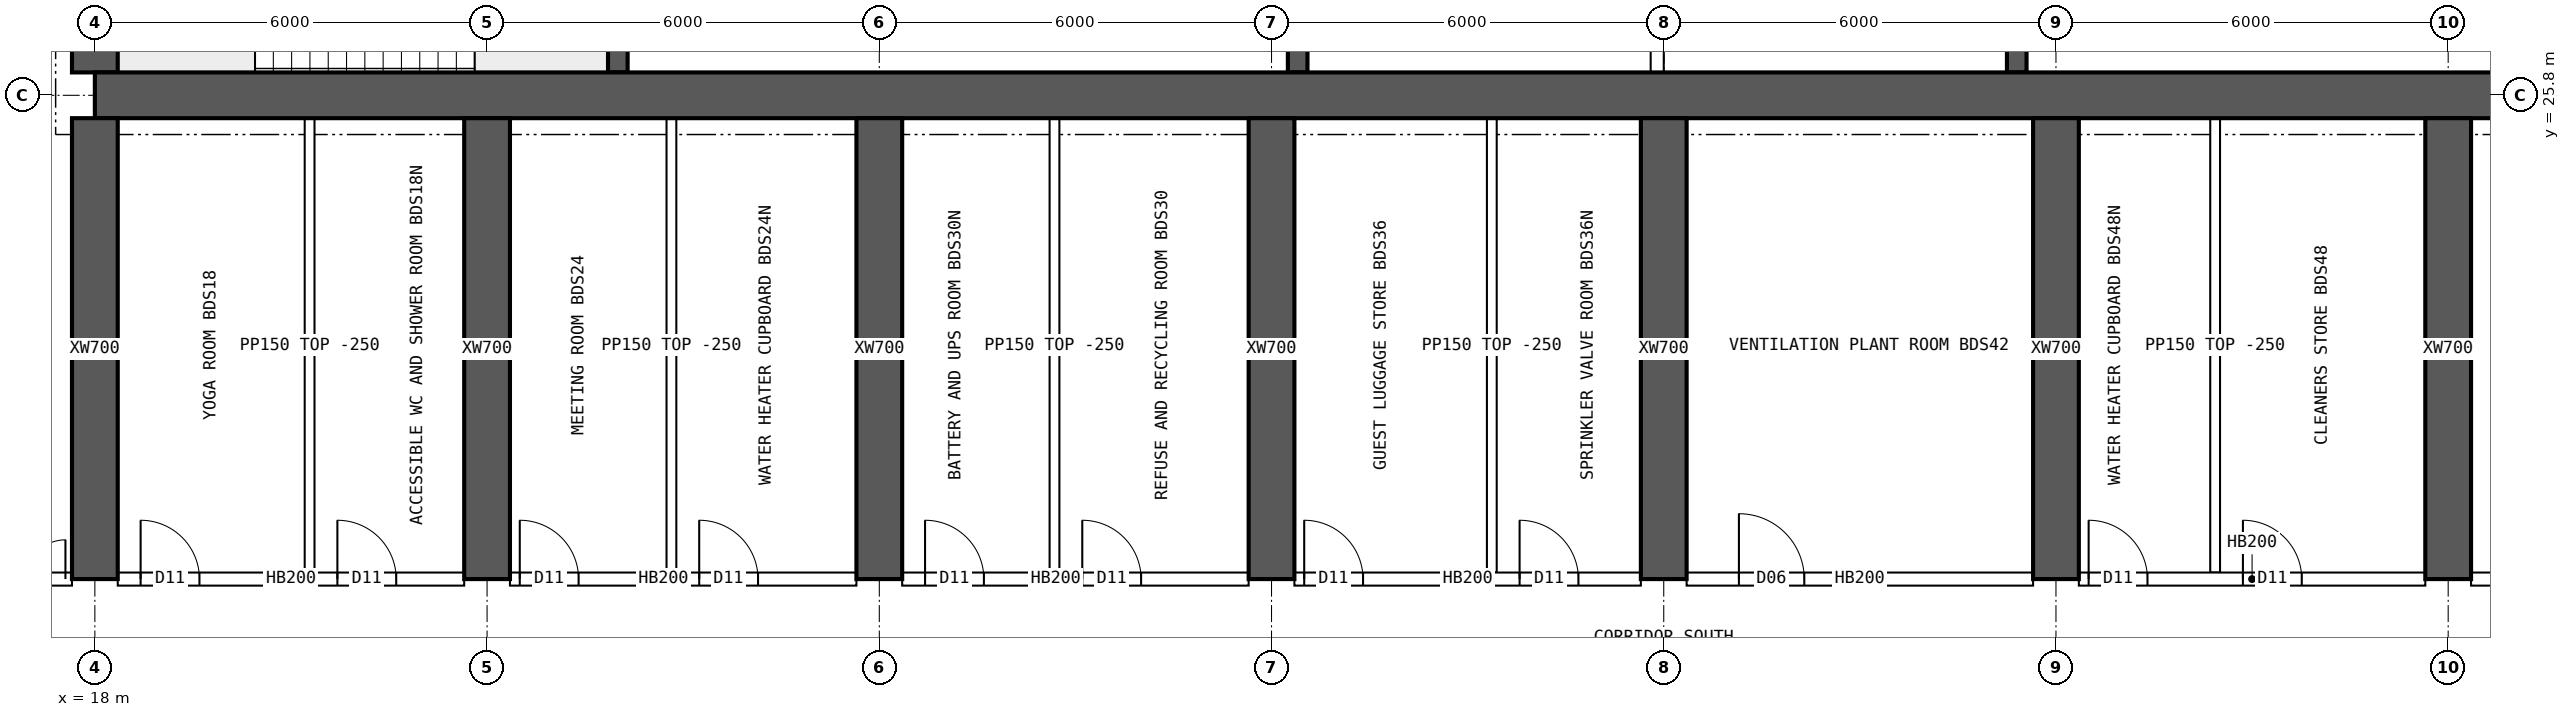
"""IFC4 building model, lengths in metres.
Left out: names, types, materials, properties, quantities, classifications, styles, units other than length and angle.
Written with IfcOpenShell. Run it as: python <this file> out.ifc"""

import sys

from ifc_helpers import new_model, si_unit, direction, frame, frame_2d, origin, place, context, subcontext, project, spatial, rectangle, extrude, element, fill, save


model = new_model("IFC4")
c1 = context("Model", 3, precision=1e-05, world=origin(), true_north=direction((0.0, 1.0)))
c2 = subcontext(c1, "Body", "Model", "MODEL_VIEW")
j1 = project(units=[si_unit("LENGTHUNIT", "METRE"), si_unit("PLANEANGLEUNIT", "RADIAN")], contexts=[c1])
p1 = place(None, origin())
s1 = spatial("IfcSite", under=j1, at=p1, CompositionType="ELEMENT")
p2 = place(p1, origin())
s2 = spatial("IfcBuilding", under=s1, at=p2, CompositionType="ELEMENT")
p3 = place(p2, frame((0.0, 0.0, 208.3)))
s3 = spatial("IfcBuildingStorey", under=s2, at=p3, CompositionType="ELEMENT", Elevation=208.3)
p4 = place(p3, frame((18.0, 25.8, 0.0), z_axis=(0.0, 0.0, 1.0), x_axis=(1.0, 0.0, 0.0)))
e1 = element("IfcWall", 1, at=p4, inside=s3, PredefinedType="SHEAR", context=c2, shape_type="SweptSolid", body=[
    extrude(rectangle(XDim=48.0, YDim=0.7, at=frame_2d((24.0, 0.0))), origin(), (0.0, 0.0, 1.0), 4.5),
])
p5 = place(p3, frame((18.0, 26.15, 0.0), z_axis=(0.0, 0.0, 1.0), x_axis=(0.0, 1.0, 0.0)))
e2 = element("IfcWall", 2, at=p5, inside=s3, PredefinedType="SHEAR", context=c2, shape_type="SweptSolid", body=[
    extrude(rectangle(XDim=11.7, YDim=0.7, at=frame_2d((5.85, 0.0))), origin(), (0.0, 0.0, 1.0), 4.5),
])
p6 = place(p5, frame((5.15, 0.0, 0.0)))
e3 = element("IfcOpeningElement", 3, at=p6, cuts=e2, PredefinedType="OPENING", context=c2, shape_type="SweptSolid", body=[
    extrude(rectangle(XDim=1.2, YDim=2.1, at=frame_2d((0.6, 1.05))), frame((0.0, 0.36, 0.0), z_axis=(0.0, -1.0, 0.0), x_axis=(1.0, 0.0, 0.0)), (0.0, 0.0, 1.0), 0.72),
])
for number, where, z_axis, x_axis in (
    (4, (26.0, 26.15, 0.0), (0.0, 0.0, 1.0), (0.0, 1.0, 0.0)),
    (5, (36.4, 26.15, 0.0), (0.0, 0.0, 1.0), (0.0, 1.0, 0.0)),
    (6, (47.4, 26.15, 0.0), (0.0, 0.0, 1.0), (0.0, 1.0, 0.0)),
):
    element("IfcWall", number, at=place(p3, frame(where, z_axis=z_axis, x_axis=x_axis)), inside=s3, PredefinedType="SHEAR", context=c2, shape_type="SweptSolid", body=[
        extrude(rectangle(XDim=4.1, YDim=0.3, at=frame_2d((2.05, 0.0))), origin(), (0.0, 0.0, 1.0), 4.5),
    ])
for number, where, z_axis, x_axis in (
    (7, (18.0, 18.4, 0.0), (0.0, 0.0, 1.0), (0.0, 1.0, 0.0)),
    (8, (24.0, 18.4, 0.0), (0.0, 0.0, 1.0), (0.0, 1.0, 0.0)),
    (9, (30.0, 18.4, 0.0), (0.0, 0.0, 1.0), (0.0, 1.0, 0.0)),
    (10, (36.0, 18.4, 0.0), (0.0, 0.0, 1.0), (0.0, 1.0, 0.0)),
    (11, (42.0, 18.4, 0.0), (0.0, 0.0, 1.0), (0.0, 1.0, 0.0)),
    (12, (48.0, 18.4, 0.0), (0.0, 0.0, 1.0), (0.0, 1.0, 0.0)),
    (13, (54.0, 18.4, 0.0), (0.0, 0.0, 1.0), (0.0, 1.0, 0.0)),
):
    element("IfcWall", number, at=place(p3, frame(where, z_axis=z_axis, x_axis=x_axis)), inside=s3, PredefinedType="SHEAR", context=c2, shape_type="SweptSolid", body=[
        extrude(rectangle(XDim=7.05, YDim=0.7, at=frame_2d((3.525, 0.0))), origin(), (0.0, 0.0, 1.0), 4.5),
    ])
p7 = place(p3, frame((41.9, 26.15, 0.0), z_axis=(0.0, 0.0, 1.0), x_axis=(0.0, 1.0, 0.0)))
e14 = element("IfcWall", 14, at=p7, inside=s3, PredefinedType="SOLIDWALL", context=c2, shape_type="SweptSolid", body=[
    extrude(rectangle(XDim=4.1, YDim=0.2, at=frame_2d((2.05, 0.0))), origin(), (0.0, 0.0, 1.0), 4.25),
])
p8 = place(p3, frame((15.6, 18.4, 0.0), z_axis=(0.0, 0.0, 1.0), x_axis=(1.0, 0.0, 0.0)))
e15 = element("IfcWall", 15, at=p8, inside=s3, PredefinedType="SOLIDWALL", context=c2, shape_type="SweptSolid", body=[
    extrude(rectangle(XDim=2.05, YDim=0.2, at=frame_2d((1.025, 0.0))), origin(), (0.0, 0.0, 1.0), 4.25),
])
p9 = place(p8, frame((0.75, 0.0, 0.0)))
e16 = element("IfcOpeningElement", 16, at=p9, cuts=e15, PredefinedType="OPENING", context=c2, shape_type="SweptSolid", body=[
    extrude(rectangle(XDim=1.2, YDim=2.1, at=frame_2d((0.6, 1.05))), frame((0.0, 0.11, 0.0), z_axis=(0.0, -1.0, 0.0), x_axis=(1.0, 0.0, 0.0)), (0.0, 0.0, 1.0), 0.22),
])
p10 = place(p3, frame((18.35, 18.4, 0.0), z_axis=(0.0, 0.0, 1.0), x_axis=(1.0, 0.0, 0.0)))
e17 = element("IfcWall", 17, at=p10, inside=s3, PredefinedType="SOLIDWALL", context=c2, shape_type="SweptSolid", body=[
    extrude(rectangle(XDim=5.3, YDim=0.2, at=frame_2d((2.65, 0.0))), origin(), (0.0, 0.0, 1.0), 4.25),
])
p11 = place(p10, frame((0.35, 0.0, 0.0)))
e18 = element("IfcOpeningElement", 18, at=p11, cuts=e17, PredefinedType="OPENING", context=c2, shape_type="SweptSolid", body=[
    extrude(rectangle(XDim=0.9, YDim=2.1, at=frame_2d((0.45, 1.05))), frame((0.0, 0.11, 0.0), z_axis=(0.0, -1.0, 0.0), x_axis=(1.0, 0.0, 0.0)), (0.0, 0.0, 1.0), 0.22),
])
p12 = place(p10, frame((3.36, 0.0, 0.0)))
e19 = element("IfcOpeningElement", 19, at=p12, cuts=e17, PredefinedType="OPENING", context=c2, shape_type="SweptSolid", body=[
    extrude(rectangle(XDim=0.9, YDim=2.1, at=frame_2d((0.45, 1.05))), frame((0.0, 0.11, 0.0), z_axis=(0.0, -1.0, 0.0), x_axis=(1.0, 0.0, 0.0)), (0.0, 0.0, 1.0), 0.22),
])
p13 = place(p3, frame((24.35, 18.4, 0.0), z_axis=(0.0, 0.0, 1.0), x_axis=(1.0, 0.0, 0.0)))
e20 = element("IfcWall", 20, at=p13, inside=s3, PredefinedType="SOLIDWALL", context=c2, shape_type="SweptSolid", body=[
    extrude(rectangle(XDim=5.3, YDim=0.2, at=frame_2d((2.65, 0.0))), origin(), (0.0, 0.0, 1.0), 4.25),
])
p14 = place(p13, frame((0.15, 0.0, 0.0)))
e21 = element("IfcOpeningElement", 21, at=p14, cuts=e20, PredefinedType="OPENING", context=c2, shape_type="SweptSolid", body=[
    extrude(rectangle(XDim=0.9, YDim=2.1, at=frame_2d((0.45, 1.05))), frame((0.0, 0.11, 0.0), z_axis=(0.0, -1.0, 0.0), x_axis=(1.0, 0.0, 0.0)), (0.0, 0.0, 1.0), 0.22),
])
p15 = place(p13, frame((2.895, 0.0, 0.0)))
e22 = element("IfcOpeningElement", 22, at=p15, cuts=e20, PredefinedType="OPENING", context=c2, shape_type="SweptSolid", body=[
    extrude(rectangle(XDim=0.9, YDim=2.1, at=frame_2d((0.45, 1.05))), frame((0.0, 0.11, 0.0), z_axis=(0.0, -1.0, 0.0), x_axis=(1.0, 0.0, 0.0)), (0.0, 0.0, 1.0), 0.22),
])
p16 = place(p3, frame((30.35, 18.4, 0.0), z_axis=(0.0, 0.0, 1.0), x_axis=(1.0, 0.0, 0.0)))
e23 = element("IfcWall", 23, at=p16, inside=s3, PredefinedType="SOLIDWALL", context=c2, shape_type="SweptSolid", body=[
    extrude(rectangle(XDim=5.3, YDim=0.2, at=frame_2d((2.65, 0.0))), origin(), (0.0, 0.0, 1.0), 4.25),
])
p17 = place(p16, frame((0.35, 0.0, 0.0)))
e24 = element("IfcOpeningElement", 24, at=p17, cuts=e23, PredefinedType="OPENING", context=c2, shape_type="SweptSolid", body=[
    extrude(rectangle(XDim=0.9, YDim=2.1, at=frame_2d((0.45, 1.05))), frame((0.0, 0.11, 0.0), z_axis=(0.0, -1.0, 0.0), x_axis=(1.0, 0.0, 0.0)), (0.0, 0.0, 1.0), 0.22),
])
p18 = place(p16, frame((2.755, 0.0, 0.0)))
e25 = element("IfcOpeningElement", 25, at=p18, cuts=e23, PredefinedType="OPENING", context=c2, shape_type="SweptSolid", body=[
    extrude(rectangle(XDim=0.9, YDim=2.1, at=frame_2d((0.45, 1.05))), frame((0.0, 0.11, 0.0), z_axis=(0.0, -1.0, 0.0), x_axis=(1.0, 0.0, 0.0)), (0.0, 0.0, 1.0), 0.22),
])
p19 = place(p3, frame((36.35, 18.4, 0.0), z_axis=(0.0, 0.0, 1.0), x_axis=(1.0, 0.0, 0.0)))
e26 = element("IfcWall", 26, at=p19, inside=s3, PredefinedType="SOLIDWALL", context=c2, shape_type="SweptSolid", body=[
    extrude(rectangle(XDim=5.3, YDim=0.2, at=frame_2d((2.65, 0.0))), origin(), (0.0, 0.0, 1.0), 4.25),
])
p20 = place(p19, frame((0.15, 0.0, 0.0)))
e27 = element("IfcOpeningElement", 27, at=p20, cuts=e26, PredefinedType="OPENING", context=c2, shape_type="SweptSolid", body=[
    extrude(rectangle(XDim=0.9, YDim=2.1, at=frame_2d((0.45, 1.05))), frame((0.0, 0.11, 0.0), z_axis=(0.0, -1.0, 0.0), x_axis=(1.0, 0.0, 0.0)), (0.0, 0.0, 1.0), 0.22),
])
p21 = place(p19, frame((3.445, 0.0, 0.0)))
e28 = element("IfcOpeningElement", 28, at=p21, cuts=e26, PredefinedType="OPENING", context=c2, shape_type="SweptSolid", body=[
    extrude(rectangle(XDim=0.9, YDim=2.1, at=frame_2d((0.45, 1.05))), frame((0.0, 0.11, 0.0), z_axis=(0.0, -1.0, 0.0), x_axis=(1.0, 0.0, 0.0)), (0.0, 0.0, 1.0), 0.22),
])
p22 = place(p3, frame((42.35, 18.4, 0.0), z_axis=(0.0, 0.0, 1.0), x_axis=(1.0, 0.0, 0.0)))
e29 = element("IfcWall", 29, at=p22, inside=s3, PredefinedType="SOLIDWALL", context=c2, shape_type="SweptSolid", body=[
    extrude(rectangle(XDim=5.3, YDim=0.2, at=frame_2d((2.65, 0.0))), origin(), (0.0, 0.0, 1.0), 4.25),
])
p23 = place(p22, frame((0.8, 0.0, 0.0)))
e30 = element("IfcOpeningElement", 30, at=p23, cuts=e29, PredefinedType="OPENING", context=c2, shape_type="SweptSolid", body=[
    extrude(rectangle(XDim=1.0, YDim=2.1, at=frame_2d((0.5, 1.05))), frame((0.0, 0.11, 0.0), z_axis=(0.0, -1.0, 0.0), x_axis=(1.0, 0.0, 0.0)), (0.0, 0.0, 1.0), 0.22),
])
p24 = place(p3, frame((48.35, 18.4, 0.0), z_axis=(0.0, 0.0, 1.0), x_axis=(1.0, 0.0, 0.0)))
e31 = element("IfcWall", 31, at=p24, inside=s3, PredefinedType="SOLIDWALL", context=c2, shape_type="SweptSolid", body=[
    extrude(rectangle(XDim=5.3, YDim=0.2, at=frame_2d((2.65, 0.0))), origin(), (0.0, 0.0, 1.0), 4.25),
])
p25 = place(p24, frame((0.15, 0.0, 0.0)))
e32 = element("IfcOpeningElement", 32, at=p25, cuts=e31, PredefinedType="OPENING", context=c2, shape_type="SweptSolid", body=[
    extrude(rectangle(XDim=0.9, YDim=2.1, at=frame_2d((0.45, 1.05))), frame((0.0, 0.11, 0.0), z_axis=(0.0, -1.0, 0.0), x_axis=(1.0, 0.0, 0.0)), (0.0, 0.0, 1.0), 0.22),
])
p26 = place(p24, frame((2.51, 0.0, 0.0)))
e33 = element("IfcOpeningElement", 33, at=p26, cuts=e31, PredefinedType="OPENING", context=c2, shape_type="SweptSolid", body=[
    extrude(rectangle(XDim=0.9, YDim=2.1, at=frame_2d((0.45, 1.05))), frame((0.0, 0.11, 0.0), z_axis=(0.0, -1.0, 0.0), x_axis=(1.0, 0.0, 0.0)), (0.0, 0.0, 1.0), 0.22),
])
p27 = place(p3, frame((54.35, 18.4, 0.0), z_axis=(0.0, 0.0, 1.0), x_axis=(1.0, 0.0, 0.0)))
e34 = element("IfcWall", 34, at=p27, inside=s3, PredefinedType="SOLIDWALL", context=c2, shape_type="SweptSolid", body=[
    extrude(rectangle(XDim=5.3, YDim=0.2, at=frame_2d((2.65, 0.0))), origin(), (0.0, 0.0, 1.0), 4.25),
])
p28 = place(p27, frame((0.8, 0.0, 0.0)))
e35 = element("IfcOpeningElement", 35, at=p28, cuts=e34, PredefinedType="OPENING", context=c2, shape_type="SweptSolid", body=[
    extrude(rectangle(XDim=1.0, YDim=2.1, at=frame_2d((0.5, 1.05))), frame((0.0, 0.11, 0.0), z_axis=(0.0, -1.0, 0.0), x_axis=(1.0, 0.0, 0.0)), (0.0, 0.0, 1.0), 0.22),
])
for number, where, z_axis, x_axis in (
    (36, (21.285, 18.5, 0.0), (0.0, 0.0, 1.0), (0.0, 1.0, 0.0)),
    (37, (26.82, 18.5, 0.0), (0.0, 0.0, 1.0), (0.0, 1.0, 0.0)),
    (38, (32.68, 18.5, 0.0), (0.0, 0.0, 1.0), (0.0, 1.0, 0.0)),
    (39, (39.37, 18.5, 0.0), (0.0, 0.0, 1.0), (0.0, 1.0, 0.0)),
    (40, (50.435, 18.5, 0.0), (0.0, 0.0, 1.0), (0.0, 1.0, 0.0)),
):
    element("IfcWall", number, at=place(p3, frame(where, z_axis=z_axis, x_axis=x_axis)), inside=s3, PredefinedType="PARTITIONING", context=c2, shape_type="SweptSolid", body=[
        extrude(rectangle(XDim=6.95, YDim=0.15, at=frame_2d((3.475, 0.0))), origin(), (0.0, 0.0, 1.0), 4.25),
    ])
p29 = place(p9, origin())
e41 = element("IfcDoor", 41, at=p29, inside=s3, OperationType="DOUBLE_DOOR_SINGLE_SWING", PredefinedType="DOOR", context=c2, shape_type="SweptSolid", body=[
    extrude(rectangle(XDim=1.2, YDim=2.1, at=frame_2d((0.6, 1.05))), frame((0.0, 0.025, 0.0), z_axis=(0.0, -1.0, 0.0), x_axis=(1.0, 0.0, 0.0)), (0.0, 0.0, 1.0), 0.05),
])
fill(e16, e41)
p30 = place(p11, origin())
e42 = element("IfcDoor", 42, at=p30, inside=s3, OperationType="SINGLE_SWING_LEFT", PredefinedType="DOOR", context=c2, shape_type="SweptSolid", body=[
    extrude(rectangle(XDim=0.9, YDim=2.1, at=frame_2d((0.45, 1.05))), frame((0.0, 0.025, 0.0), z_axis=(0.0, -1.0, 0.0), x_axis=(1.0, 0.0, 0.0)), (0.0, 0.0, 1.0), 0.05),
])
fill(e18, e42)
p31 = place(p12, origin())
e43 = element("IfcDoor", 43, at=p31, inside=s3, OperationType="SINGLE_SWING_LEFT", PredefinedType="DOOR", context=c2, shape_type="SweptSolid", body=[
    extrude(rectangle(XDim=0.9, YDim=2.1, at=frame_2d((0.45, 1.05))), frame((0.0, 0.025, 0.0), z_axis=(0.0, -1.0, 0.0), x_axis=(1.0, 0.0, 0.0)), (0.0, 0.0, 1.0), 0.05),
])
fill(e19, e43)
p32 = place(p14, origin())
e44 = element("IfcDoor", 44, at=p32, inside=s3, OperationType="SINGLE_SWING_LEFT", PredefinedType="DOOR", context=c2, shape_type="SweptSolid", body=[
    extrude(rectangle(XDim=0.9, YDim=2.1, at=frame_2d((0.45, 1.05))), frame((0.0, 0.025, 0.0), z_axis=(0.0, -1.0, 0.0), x_axis=(1.0, 0.0, 0.0)), (0.0, 0.0, 1.0), 0.05),
])
fill(e21, e44)
p33 = place(p15, origin())
e45 = element("IfcDoor", 45, at=p33, inside=s3, OperationType="SINGLE_SWING_LEFT", PredefinedType="DOOR", context=c2, shape_type="SweptSolid", body=[
    extrude(rectangle(XDim=0.9, YDim=2.1, at=frame_2d((0.45, 1.05))), frame((0.0, 0.025, 0.0), z_axis=(0.0, -1.0, 0.0), x_axis=(1.0, 0.0, 0.0)), (0.0, 0.0, 1.0), 0.05),
])
fill(e22, e45)
p34 = place(p17, origin())
e46 = element("IfcDoor", 46, at=p34, inside=s3, OperationType="SINGLE_SWING_LEFT", PredefinedType="DOOR", context=c2, shape_type="SweptSolid", body=[
    extrude(rectangle(XDim=0.9, YDim=2.1, at=frame_2d((0.45, 1.05))), frame((0.0, 0.025, 0.0), z_axis=(0.0, -1.0, 0.0), x_axis=(1.0, 0.0, 0.0)), (0.0, 0.0, 1.0), 0.05),
])
fill(e24, e46)
p35 = place(p18, origin())
e47 = element("IfcDoor", 47, at=p35, inside=s3, OperationType="SINGLE_SWING_LEFT", PredefinedType="DOOR", context=c2, shape_type="SweptSolid", body=[
    extrude(rectangle(XDim=0.9, YDim=2.1, at=frame_2d((0.45, 1.05))), frame((0.0, 0.025, 0.0), z_axis=(0.0, -1.0, 0.0), x_axis=(1.0, 0.0, 0.0)), (0.0, 0.0, 1.0), 0.05),
])
fill(e25, e47)
p36 = place(p20, origin())
e48 = element("IfcDoor", 48, at=p36, inside=s3, OperationType="SINGLE_SWING_LEFT", PredefinedType="DOOR", context=c2, shape_type="SweptSolid", body=[
    extrude(rectangle(XDim=0.9, YDim=2.1, at=frame_2d((0.45, 1.05))), frame((0.0, 0.025, 0.0), z_axis=(0.0, -1.0, 0.0), x_axis=(1.0, 0.0, 0.0)), (0.0, 0.0, 1.0), 0.05),
])
fill(e27, e48)
p37 = place(p21, origin())
e49 = element("IfcDoor", 49, at=p37, inside=s3, OperationType="SINGLE_SWING_LEFT", PredefinedType="DOOR", context=c2, shape_type="SweptSolid", body=[
    extrude(rectangle(XDim=0.9, YDim=2.1, at=frame_2d((0.45, 1.05))), frame((0.0, 0.025, 0.0), z_axis=(0.0, -1.0, 0.0), x_axis=(1.0, 0.0, 0.0)), (0.0, 0.0, 1.0), 0.05),
])
fill(e28, e49)
p38 = place(p23, origin())
e50 = element("IfcDoor", 50, at=p38, inside=s3, OperationType="SINGLE_SWING_LEFT", PredefinedType="DOOR", context=c2, shape_type="SweptSolid", body=[
    extrude(rectangle(XDim=1.0, YDim=2.1, at=frame_2d((0.5, 1.05))), frame((0.0, 0.025, 0.0), z_axis=(0.0, -1.0, 0.0), x_axis=(1.0, 0.0, 0.0)), (0.0, 0.0, 1.0), 0.05),
])
fill(e30, e50)
p39 = place(p25, origin())
e51 = element("IfcDoor", 51, at=p39, inside=s3, OperationType="SINGLE_SWING_LEFT", PredefinedType="DOOR", context=c2, shape_type="SweptSolid", body=[
    extrude(rectangle(XDim=0.9, YDim=2.1, at=frame_2d((0.45, 1.05))), frame((0.0, 0.025, 0.0), z_axis=(0.0, -1.0, 0.0), x_axis=(1.0, 0.0, 0.0)), (0.0, 0.0, 1.0), 0.05),
])
fill(e32, e51)
p40 = place(p26, origin())
e52 = element("IfcDoor", 52, at=p40, inside=s3, OperationType="SINGLE_SWING_LEFT", PredefinedType="DOOR", context=c2, shape_type="SweptSolid", body=[
    extrude(rectangle(XDim=0.9, YDim=2.1, at=frame_2d((0.45, 1.05))), frame((0.0, 0.025, 0.0), z_axis=(0.0, -1.0, 0.0), x_axis=(1.0, 0.0, 0.0)), (0.0, 0.0, 1.0), 0.05),
])
fill(e33, e52)
save(model, sys.argv[1])
